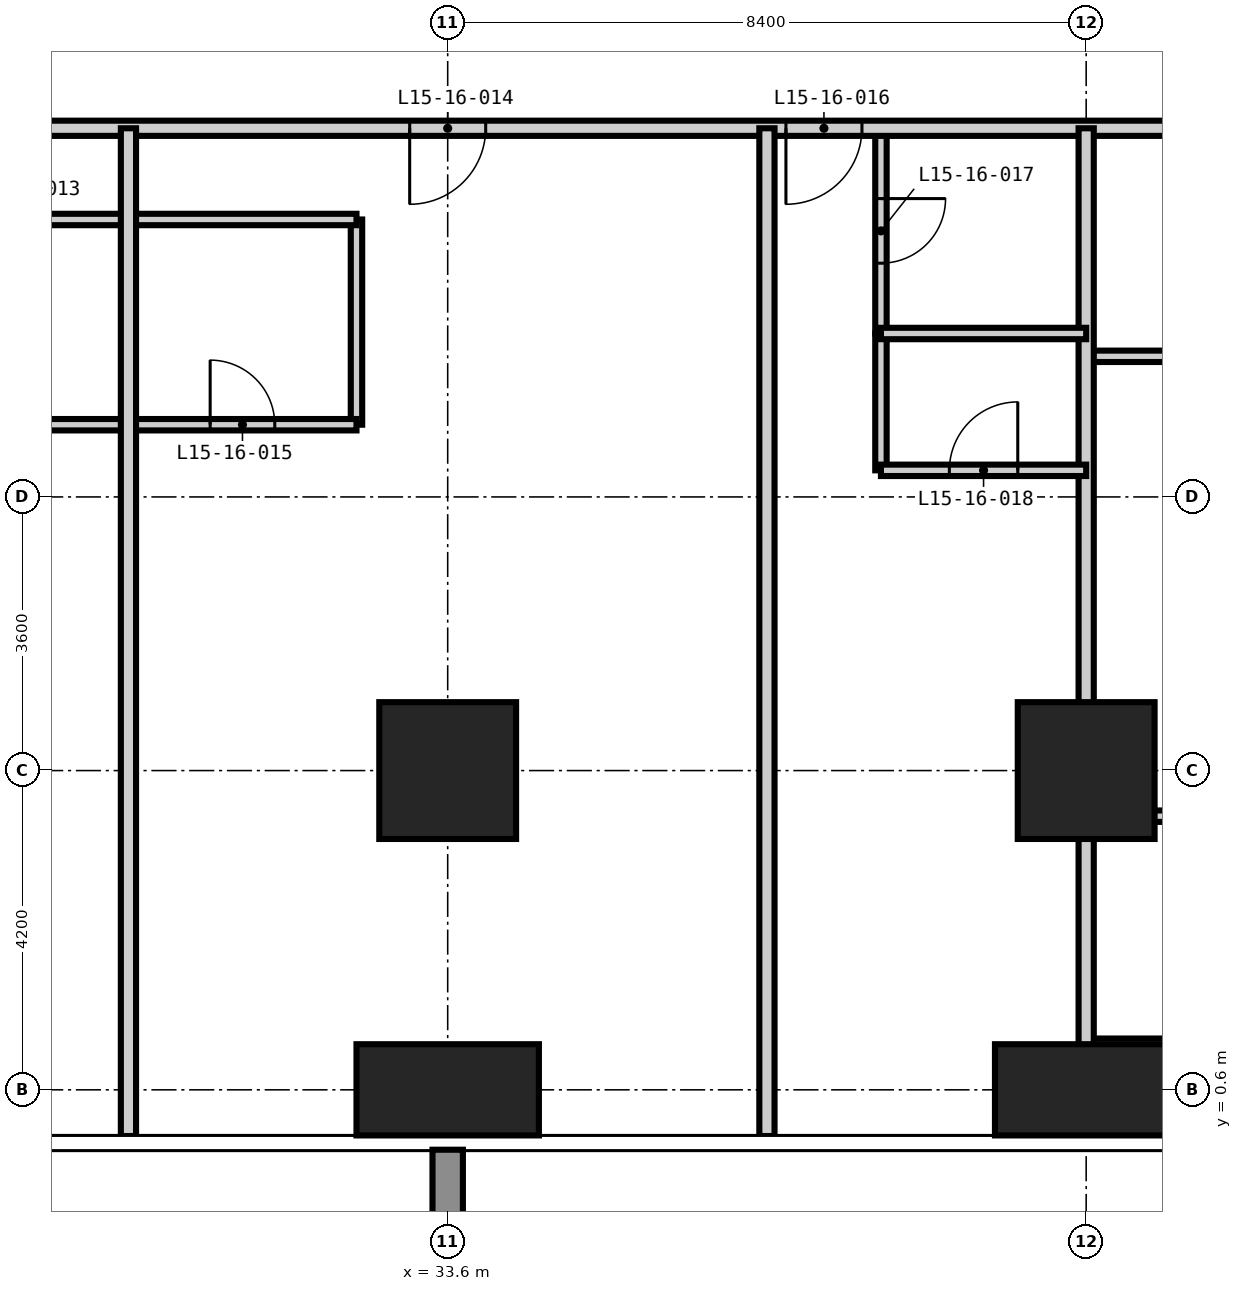
"""IFC4 building model, lengths in metres.
Left out: names, types, materials, properties, quantities, classifications, styles, units other than length and angle.
Written with IfcOpenShell. Run it as: python <this file> out.ifc"""

import sys

from ifc_helpers import new_model, si_unit, direction, frame, frame_2d, origin, origin_2d, place, context, subcontext, project, spatial, rectangle, extrude, element, fill, save


model = new_model("IFC4")
c1 = context("Model", 3, precision=1e-05, world=origin(), true_north=direction((0.0, 1.0)))
c2 = subcontext(c1, "Body", "Model", "MODEL_VIEW")
j1 = project(units=[si_unit("LENGTHUNIT", "METRE"), si_unit("PLANEANGLEUNIT", "RADIAN")], contexts=[c1])
p1 = place(None, origin())
s1 = spatial("IfcSite", under=j1, at=p1, CompositionType="ELEMENT")
p2 = place(p1, origin())
s2 = spatial("IfcBuilding", under=s1, at=p2, CompositionType="ELEMENT")
p3 = place(p2, frame((0.0, 0.0, 63.0)))
s3 = spatial("IfcBuildingStorey", under=s2, at=p3, CompositionType="ELEMENT", Elevation=63.0)
p4 = place(p3, frame((33.6, 0.6, -0.35), z_axis=(0.0, 0.0, 1.0), x_axis=(1.0, 0.0, 0.0)))
e1 = element("IfcColumn", 1, at=p4, inside=s3, PredefinedType="COLUMN", context=c2, shape_type="SweptSolid", body=[
    extrude(rectangle(XDim=2.4, YDim=1.2, at=origin_2d()), origin(), (0.0, 0.0, 1.0), 3.6),
])
p5 = place(p3, frame((33.6, 4.8, -0.35), z_axis=(0.0, 0.0, 1.0), x_axis=(1.0, 0.0, 0.0)))
e2 = element("IfcColumn", 2, at=p5, inside=s3, PredefinedType="COLUMN", context=c2, shape_type="SweptSolid", body=[
    extrude(rectangle(XDim=1.8, YDim=1.8, at=origin_2d()), origin(), (0.0, 0.0, 1.0), 3.6),
])
p6 = place(p3, frame((42.0, 0.6, -0.35), z_axis=(0.0, 0.0, 1.0), x_axis=(1.0, 0.0, 0.0)))
e3 = element("IfcColumn", 3, at=p6, inside=s3, PredefinedType="COLUMN", context=c2, shape_type="SweptSolid", body=[
    extrude(rectangle(XDim=2.4, YDim=1.2, at=origin_2d()), origin(), (0.0, 0.0, 1.0), 3.6),
])
p7 = place(p3, frame((42.0, 4.8, -0.35), z_axis=(0.0, 0.0, 1.0), x_axis=(1.0, 0.0, 0.0)))
e4 = element("IfcColumn", 4, at=p7, inside=s3, PredefinedType="COLUMN", context=c2, shape_type="SweptSolid", body=[
    extrude(rectangle(XDim=1.8, YDim=1.8, at=origin_2d()), origin(), (0.0, 0.0, 1.0), 3.6),
])
p8 = place(p3, frame((32.4, 9.35, 0.0), z_axis=(0.0, 0.0, 1.0), x_axis=(0.0, 1.0, 0.0)))
e5 = element("IfcWall", 5, at=p8, inside=s3, PredefinedType="PARTITIONING", context=c2, shape_type="SweptSolid", body=[
    extrude(rectangle(XDim=2.7, YDim=0.15, at=frame_2d((1.35, 0.0))), origin(), (0.0, 0.0, 1.0), 3.25),
])
p9 = place(p3, frame((39.3, 10.55, 0.0), z_axis=(0.0, 0.0, 1.0), x_axis=(0.0, 1.0, 0.0)))
e6 = element("IfcWall", 6, at=p9, inside=s3, PredefinedType="PARTITIONING", context=c2, shape_type="SweptSolid", body=[
    extrude(rectangle(XDim=2.7, YDim=0.15, at=frame_2d((1.35, 0.0))), origin(), (0.0, 0.0, 1.0), 3.25),
])
p10 = place(p9, frame((0.925, 0.0, 0.0)))
e7 = element("IfcOpeningElement", 7, at=p10, cuts=e6, PredefinedType="OPENING", context=c2, shape_type="SweptSolid", body=[
    extrude(rectangle(XDim=0.85, YDim=2.1, at=frame_2d((0.425, 1.05))), frame((0.0, 0.085, 0.0), z_axis=(0.0, -1.0, 0.0), x_axis=(1.0, 0.0, 0.0)), (0.0, 0.0, 1.0), 0.17),
])
p11 = place(p3, frame((42.0, 1.2, 0.0), z_axis=(0.0, 0.0, 1.0), x_axis=(1.0, 0.0, 0.0)))
e8 = element("IfcWall", 8, at=p11, inside=s3, PredefinedType="PARTITIONING", context=c2, shape_type="SweptSolid", body=[
    extrude(rectangle(XDim=3.6, YDim=0.15, at=frame_2d((1.8, 0.0))), origin(), (0.0, 0.0, 1.0), 3.25),
])
p12 = place(p11, frame((1.375, 0.0, 0.0)))
e9 = element("IfcOpeningElement", 9, at=p12, cuts=e8, PredefinedType="OPENING", context=c2, shape_type="SweptSolid", body=[
    extrude(rectangle(XDim=0.85, YDim=2.1, at=frame_2d((0.425, 1.05))), frame((0.0, 0.085, 0.0), z_axis=(0.0, -1.0, 0.0), x_axis=(1.0, 0.0, 0.0)), (0.0, 0.0, 1.0), 0.17),
])
p13 = place(p3, frame((26.4, 9.35, 0.0), z_axis=(0.0, 0.0, 1.0), x_axis=(1.0, 0.0, 0.0)))
e10 = element("IfcWall", 10, at=p13, inside=s3, PredefinedType="PARTITIONING", context=c2, shape_type="SweptSolid", body=[
    extrude(rectangle(XDim=6.0, YDim=0.15, at=frame_2d((3.0, 0.0))), origin(), (0.0, 0.0, 1.0), 3.25),
])
p14 = place(p13, frame((4.075, 0.0, 0.0)))
e11 = element("IfcOpeningElement", 11, at=p14, cuts=e10, PredefinedType="OPENING", context=c2, shape_type="SweptSolid", body=[
    extrude(rectangle(XDim=0.85, YDim=2.1, at=frame_2d((0.425, 1.05))), frame((0.0, 0.085, 0.0), z_axis=(0.0, -1.0, 0.0), x_axis=(1.0, 0.0, 0.0)), (0.0, 0.0, 1.0), 0.17),
])
p15 = place(p3, frame((42.0, 10.25, 0.0), z_axis=(0.0, 0.0, 1.0), x_axis=(1.0, 0.0, 0.0)))
e12 = element("IfcWall", 12, at=p15, inside=s3, PredefinedType="PARTITIONING", context=c2, shape_type="SweptSolid", body=[
    extrude(rectangle(XDim=4.15, YDim=0.15, at=frame_2d((2.075, 0.0))), origin(), (0.0, 0.0, 1.0), 3.25),
])
p16 = place(p15, frame((1.65, 0.0, 0.0)))
e13 = element("IfcOpeningElement", 13, at=p16, cuts=e12, PredefinedType="OPENING", context=c2, shape_type="SweptSolid", body=[
    extrude(rectangle(XDim=0.85, YDim=2.1, at=frame_2d((0.425, 1.05))), frame((0.0, 0.085, 0.0), z_axis=(0.0, -1.0, 0.0), x_axis=(1.0, 0.0, 0.0)), (0.0, 0.0, 1.0), 0.17),
])
p17 = place(p3, frame((26.4, 12.05, 0.0), z_axis=(0.0, 0.0, 1.0), x_axis=(1.0, 0.0, 0.0)))
e14 = element("IfcWall", 14, at=p17, inside=s3, PredefinedType="PARTITIONING", context=c2, shape_type="SweptSolid", body=[
    extrude(rectangle(XDim=6.0, YDim=0.15, at=frame_2d((3.0, 0.0))), origin(), (0.0, 0.0, 1.0), 3.25),
])
p18 = place(p17, frame((1.075, 0.0, 0.0)))
e15 = element("IfcOpeningElement", 15, at=p18, cuts=e14, PredefinedType="OPENING", context=c2, shape_type="SweptSolid", body=[
    extrude(rectangle(XDim=0.85, YDim=2.1, at=frame_2d((0.425, 1.05))), frame((0.0, 0.085, 0.0), z_axis=(0.0, -1.0, 0.0), x_axis=(1.0, 0.0, 0.0)), (0.0, 0.0, 1.0), 0.17),
])
p19 = place(p3, frame((46.15, 13.25, 0.0), z_axis=(0.0, 0.0, 1.0), x_axis=(-1.0, 0.0, 0.0)))
e16 = element("IfcWall", 16, at=p19, inside=s3, PredefinedType="PARTITIONING", context=c2, shape_type="SweptSolid", body=[
    extrude(rectangle(XDim=32.9, YDim=0.2, at=frame_2d((16.45, 0.0))), origin(), (0.0, 0.0, 1.0), 3.25),
])
p20 = place(p19, frame((25.4, 0.0, 0.0)))
e17 = element("IfcOpeningElement", 17, at=p20, cuts=e16, PredefinedType="OPENING", context=c2, shape_type="SweptSolid", body=[
    extrude(rectangle(XDim=1.0, YDim=2.2, at=frame_2d((0.5, 1.1))), frame((0.0, 0.11, 0.0), z_axis=(0.0, -1.0, 0.0), x_axis=(1.0, 0.0, 0.0)), (0.0, 0.0, 1.0), 0.22),
])
p21 = place(p19, frame((20.45, 0.0, 0.0)))
e18 = element("IfcOpeningElement", 18, at=p21, cuts=e16, PredefinedType="OPENING", context=c2, shape_type="SweptSolid", body=[
    extrude(rectangle(XDim=1.0, YDim=2.2, at=frame_2d((0.5, 1.1))), frame((0.0, 0.11, 0.0), z_axis=(0.0, -1.0, 0.0), x_axis=(1.0, 0.0, 0.0)), (0.0, 0.0, 1.0), 0.22),
])
p22 = place(p19, frame((12.05, 0.0, 0.0)))
e19 = element("IfcOpeningElement", 19, at=p22, cuts=e16, PredefinedType="OPENING", context=c2, shape_type="SweptSolid", body=[
    extrude(rectangle(XDim=1.0, YDim=2.2, at=frame_2d((0.5, 1.1))), frame((0.0, 0.11, 0.0), z_axis=(0.0, -1.0, 0.0), x_axis=(1.0, 0.0, 0.0)), (0.0, 0.0, 1.0), 0.22),
])
p23 = place(p19, frame((7.1, 0.0, 0.0)))
e20 = element("IfcOpeningElement", 20, at=p23, cuts=e16, PredefinedType="OPENING", context=c2, shape_type="SweptSolid", body=[
    extrude(rectangle(XDim=1.0, YDim=2.2, at=frame_2d((0.5, 1.1))), frame((0.0, 0.11, 0.0), z_axis=(0.0, -1.0, 0.0), x_axis=(1.0, 0.0, 0.0)), (0.0, 0.0, 1.0), 0.22),
])
for number, where, z_axis, x_axis in (
    (21, (29.4, -0.008, 0.0), (0.0, 0.0, 1.0), (0.0, 1.0, 0.0)),
    (22, (37.8, -0.008, 0.0), (0.0, 0.0, 1.0), (0.0, 1.0, 0.0)),
    (23, (42.0, -0.008, 0.0), (0.0, 0.0, 1.0), (0.0, 1.0, 0.0)),
):
    element("IfcWall", number, at=place(p3, frame(where, z_axis=z_axis, x_axis=x_axis)), inside=s3, PredefinedType="PARTITIONING", context=c2, shape_type="SweptSolid", body=[
        extrude(rectangle(XDim=13.258, YDim=0.2, at=frame_2d((6.629, 0.0))), origin(), (0.0, 0.0, 1.0), 3.25),
    ])
p24 = place(p3, frame((39.3, 8.75, 0.0), z_axis=(0.0, 0.0, 1.0), x_axis=(0.0, 1.0, 0.0)))
e24 = element("IfcWall", 24, at=p24, inside=s3, PredefinedType="PARTITIONING", context=c2, shape_type="SweptSolid", body=[
    extrude(rectangle(XDim=1.8, YDim=0.15, at=frame_2d((0.9, 0.0))), origin(), (0.0, 0.0, 1.0), 3.25),
])
p25 = place(p3, frame((42.0, 4.2, 0.0), z_axis=(0.0, 0.0, 1.0), x_axis=(1.0, 0.0, 0.0)))
e25 = element("IfcWall", 25, at=p25, inside=s3, PredefinedType="PARTITIONING", context=c2, shape_type="SweptSolid", body=[
    extrude(rectangle(XDim=16.808, YDim=0.15, at=frame_2d((8.404, 0.0))), origin(), (0.0, 0.0, 1.0), 3.25),
])
p26 = place(p25, frame((10.95, 0.0, 0.0)))
e26 = element("IfcOpeningElement", 26, at=p26, cuts=e25, PredefinedType="OPENING", context=c2, shape_type="SweptSolid", body=[
    extrude(rectangle(XDim=0.9, YDim=2.1, at=frame_2d((0.45, 1.05))), frame((0.0, 0.085, 0.0), z_axis=(0.0, -1.0, 0.0), x_axis=(1.0, 0.0, 0.0)), (0.0, 0.0, 1.0), 0.17),
])
p27 = place(p3, frame((39.3, 8.75, 0.0), z_axis=(0.0, 0.0, 1.0), x_axis=(1.0, 0.0, 0.0)))
e27 = element("IfcWall", 27, at=p27, inside=s3, PredefinedType="PARTITIONING", context=c2, shape_type="SweptSolid", body=[
    extrude(rectangle(XDim=2.7, YDim=0.15, at=frame_2d((1.35, 0.0))), origin(), (0.0, 0.0, 1.0), 3.25),
])
p28 = place(p27, frame((0.9, 0.0, 0.0)))
e28 = element("IfcOpeningElement", 28, at=p28, cuts=e27, PredefinedType="OPENING", context=c2, shape_type="SweptSolid", body=[
    extrude(rectangle(XDim=0.9, YDim=2.1, at=frame_2d((0.45, 1.05))), frame((0.0, 0.085, 0.0), z_axis=(0.0, -1.0, 0.0), x_axis=(1.0, 0.0, 0.0)), (0.0, 0.0, 1.0), 0.17),
])
p29 = place(p3, frame((39.3, 10.55, 0.0), z_axis=(0.0, 0.0, 1.0), x_axis=(1.0, 0.0, 0.0)))
e29 = element("IfcWall", 29, at=p29, inside=s3, PredefinedType="PARTITIONING", context=c2, shape_type="SweptSolid", body=[
    extrude(rectangle(XDim=2.7, YDim=0.15, at=frame_2d((1.35, 0.0))), origin(), (0.0, 0.0, 1.0), 3.25),
])
p30 = place(p22, origin())
e30 = element("IfcDoor", 30, at=p30, inside=s3, OperationType="SINGLE_SWING_RIGHT", PredefinedType="DOOR", context=c2, shape_type="SweptSolid", body=[
    extrude(rectangle(XDim=1.0, YDim=2.2, at=frame_2d((0.5, 1.1))), frame((0.0, 0.025, 0.0), z_axis=(0.0, -1.0, 0.0), x_axis=(1.0, 0.0, 0.0)), (0.0, 0.0, 1.0), 0.05),
])
fill(e19, e30)
p31 = place(p14, origin())
e31 = element("IfcDoor", 31, at=p31, inside=s3, OperationType="SINGLE_SWING_LEFT", PredefinedType="DOOR", context=c2, shape_type="SweptSolid", body=[
    extrude(rectangle(XDim=0.85, YDim=2.1, at=frame_2d((0.425, 1.05))), frame((0.0, 0.025, 0.0), z_axis=(0.0, -1.0, 0.0), x_axis=(1.0, 0.0, 0.0)), (0.0, 0.0, 1.0), 0.05),
])
fill(e11, e31)
p32 = place(p23, origin())
e32 = element("IfcDoor", 32, at=p32, inside=s3, OperationType="SINGLE_SWING_RIGHT", PredefinedType="DOOR", context=c2, shape_type="SweptSolid", body=[
    extrude(rectangle(XDim=1.0, YDim=2.2, at=frame_2d((0.5, 1.1))), frame((0.0, 0.025, 0.0), z_axis=(0.0, -1.0, 0.0), x_axis=(1.0, 0.0, 0.0)), (0.0, 0.0, 1.0), 0.05),
])
fill(e20, e32)
p33 = place(p10, frame((0.85, 0.0, 0.0), z_axis=(0.0, 0.0, 1.0), x_axis=(-1.0, 0.0, 0.0)))
e33 = element("IfcDoor", 33, at=p33, inside=s3, OperationType="SINGLE_SWING_LEFT", PredefinedType="DOOR", context=c2, shape_type="SweptSolid", body=[
    extrude(rectangle(XDim=0.85, YDim=2.1, at=frame_2d((0.425, 1.05))), frame((0.0, 0.025, 0.0), z_axis=(0.0, -1.0, 0.0), x_axis=(1.0, 0.0, 0.0)), (0.0, 0.0, 1.0), 0.05),
])
fill(e7, e33)
p34 = place(p28, origin())
e34 = element("IfcDoor", 34, at=p34, inside=s3, OperationType="SINGLE_SWING_RIGHT", PredefinedType="DOOR", context=c2, shape_type="SweptSolid", body=[
    extrude(rectangle(XDim=0.9, YDim=2.1, at=frame_2d((0.45, 1.05))), frame((0.0, 0.025, 0.0), z_axis=(0.0, -1.0, 0.0), x_axis=(1.0, 0.0, 0.0)), (0.0, 0.0, 1.0), 0.05),
])
fill(e28, e34)
save(model, sys.argv[1])
